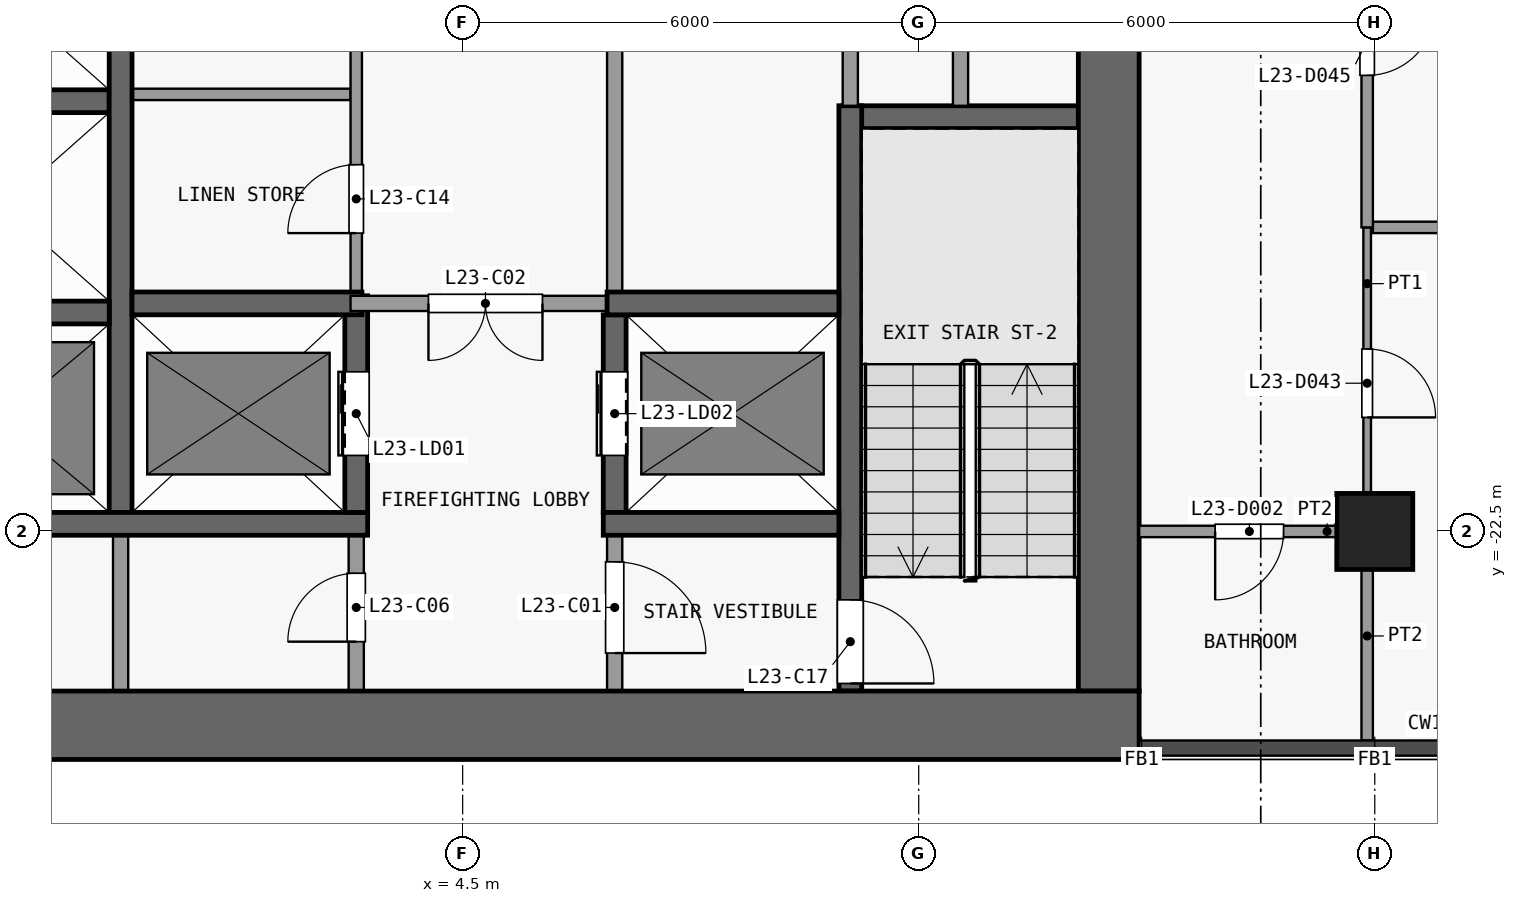
"""IFC4 building model, lengths in metres.
Left out: names, types, materials, properties, quantities, classifications, styles, units other than length and angle.
Written with IfcOpenShell. Run it as: python <this file> out.ifc"""

import sys

from ifc_helpers import new_model, si_unit, direction, frame, frame_2d, origin, origin_2d, place, context, subcontext, project, spatial, rectangle, extrude, element, fill, save


model = new_model("IFC4")
c1 = context("Model", 3, precision=1e-05, world=origin(), true_north=direction((0.0, 1.0)))
c2 = subcontext(c1, "Body", "Model", "MODEL_VIEW")
j1 = project(units=[si_unit("LENGTHUNIT", "METRE"), si_unit("PLANEANGLEUNIT", "RADIAN")], contexts=[c1])
p1 = place(None, origin())
s1 = spatial("IfcSite", under=j1, at=p1, CompositionType="ELEMENT")
p2 = place(p1, origin())
s2 = spatial("IfcBuilding", under=s1, at=p2, CompositionType="ELEMENT")
p3 = place(p2, frame((0.0, 0.0, 95.5)))
s3 = spatial("IfcBuildingStorey", under=s2, at=p3, CompositionType="ELEMENT", Elevation=95.5)
p4 = place(p3, frame((16.5, -22.5, 0.0), z_axis=(0.0, 0.0, 1.0), x_axis=(1.0, 0.0, 0.0)))
e1 = element("IfcColumn", 1, at=p4, inside=s3, PredefinedType="COLUMN", context=c2, shape_type="SweptSolid", body=[
    extrude(rectangle(XDim=1.0, YDim=1.0, at=origin_2d()), origin(), (0.0, 0.0, 1.0), 3.6),
])
p5 = place(p3, frame((-13.4, -25.05, 0.0), z_axis=(0.0, 0.0, 1.0), x_axis=(1.0, 0.0, 0.0)))
e2 = element("IfcWall", 2, at=p5, inside=s3, PredefinedType="SHEAR", context=c2, shape_type="SweptSolid", body=[
    extrude(rectangle(XDim=26.8, YDim=0.9, at=frame_2d((13.4, 0.0))), origin(), (0.0, 0.0, 1.0), 3.3),
])
p6 = place(p3, frame((13.0, -24.6, 0.0), z_axis=(0.0, 0.0, 1.0), x_axis=(0.0, 1.0, 0.0)))
e3 = element("IfcWall", 3, at=p6, inside=s3, PredefinedType="SHEAR", context=c2, shape_type="SweptSolid", body=[
    extrude(rectangle(XDim=16.1, YDim=0.8, at=frame_2d((8.05, 0.0))), origin(), (0.0, 0.0, 1.0), 3.3),
])
p7 = place(p3, frame((-2.95, -22.4, 0.0), z_axis=(0.0, 0.0, 1.0), x_axis=(1.0, 0.0, 0.0)))
e4 = element("IfcWall", 4, at=p7, inside=s3, PredefinedType="SHEAR", context=c2, shape_type="SweptSolid", body=[
    extrude(rectangle(XDim=6.2, YDim=0.3, at=frame_2d((3.1, 0.0))), origin(), (0.0, 0.0, 1.0), 3.3),
])
p8 = place(p3, frame((6.35, -22.4, 0.0), z_axis=(0.0, 0.0, 1.0), x_axis=(1.0, 0.0, 0.0)))
e5 = element("IfcWall", 5, at=p8, inside=s3, PredefinedType="SHEAR", context=c2, shape_type="SweptSolid", body=[
    extrude(rectangle(XDim=3.1, YDim=0.3, at=frame_2d((1.55, 0.0))), origin(), (0.0, 0.0, 1.0), 3.3),
])
p9 = place(p3, frame((-2.95, -19.62, 0.0), z_axis=(0.0, 0.0, 1.0), x_axis=(1.0, 0.0, 0.0)))
e6 = element("IfcWall", 6, at=p9, inside=s3, PredefinedType="SHEAR", context=c2, shape_type="SweptSolid", body=[
    extrude(rectangle(XDim=2.8, YDim=0.3, at=frame_2d((1.4, 0.0))), origin(), (0.0, 0.0, 1.0), 3.3),
])
p10 = place(p3, frame((0.15, -19.5, 0.0), z_axis=(0.0, 0.0, 1.0), x_axis=(1.0, 0.0, 0.0)))
e7 = element("IfcWall", 7, at=p10, inside=s3, PredefinedType="SHEAR", context=c2, shape_type="SweptSolid", body=[
    extrude(rectangle(XDim=3.025, YDim=0.3, at=frame_2d((1.513, 0.0))), origin(), (0.0, 0.0, 1.0), 3.3),
])
p11 = place(p3, frame((6.4, -19.5, 0.0), z_axis=(0.0, 0.0, 1.0), x_axis=(-1.0, 0.0, 0.0)))
e8 = element("IfcWall", 8, at=p11, inside=s3, PredefinedType="PARTITIONING", context=c2, shape_type="SweptSolid", body=[
    extrude(rectangle(XDim=3.375, YDim=0.2, at=frame_2d((1.688, 0.0))), origin(), (0.0, 0.0, 1.0), 3.3),
])
p12 = place(p11, frame((0.85, 0.0, 0.0)))
e9 = element("IfcOpeningElement", 9, at=p12, cuts=e8, PredefinedType="OPENING", context=c2, shape_type="SweptSolid", body=[
    extrude(rectangle(XDim=1.5, YDim=2.1, at=frame_2d((0.75, 1.05))), frame((0.0, 0.11, 0.0), z_axis=(0.0, -1.0, 0.0), x_axis=(1.0, 0.0, 0.0)), (0.0, 0.0, 1.0), 0.22),
])
p13 = place(p3, frame((6.4, -19.5, 0.0), z_axis=(0.0, 0.0, 1.0), x_axis=(1.0, 0.0, 0.0)))
e10 = element("IfcWall", 10, at=p13, inside=s3, PredefinedType="SHEAR", context=c2, shape_type="SweptSolid", body=[
    extrude(rectangle(XDim=3.05, YDim=0.3, at=frame_2d((1.525, 0.0))), origin(), (0.0, 0.0, 1.0), 3.3),
])
p14 = place(p3, frame((9.5, -17.05, 0.0), z_axis=(0.0, 0.0, 1.0), x_axis=(1.0, 0.0, 0.0)))
e11 = element("IfcWall", 11, at=p14, inside=s3, PredefinedType="SHEAR", context=c2, shape_type="SweptSolid", body=[
    extrude(rectangle(XDim=3.1, YDim=0.3, at=frame_2d((1.55, 0.0))), origin(), (0.0, 0.0, 1.0), 3.3),
])
p15 = place(p3, frame((-2.95, -16.84, 0.0), z_axis=(0.0, 0.0, 1.0), x_axis=(1.0, 0.0, 0.0)))
e12 = element("IfcWall", 12, at=p15, inside=s3, PredefinedType="SHEAR", context=c2, shape_type="SweptSolid", body=[
    extrude(rectangle(XDim=2.8, YDim=0.3, at=frame_2d((1.4, 0.0))), origin(), (0.0, 0.0, 1.0), 3.3),
])
p16 = place(p3, frame((0.15, -16.75, 0.0), z_axis=(0.0, 0.0, 1.0), x_axis=(1.0, 0.0, 0.0)))
e13 = element("IfcWall", 13, at=p16, inside=s3, PredefinedType="PARTITIONING", context=c2, shape_type="SweptSolid", body=[
    extrude(rectangle(XDim=2.875, YDim=0.15, at=frame_2d((1.438, 0.0))), origin(), (0.0, 0.0, 1.0), 3.3),
])
p17 = place(p3, frame((0.0, -24.6, 0.0), z_axis=(0.0, 0.0, 1.0), x_axis=(0.0, 1.0, 0.0)))
e14 = element("IfcWall", 14, at=p17, inside=s3, PredefinedType="PARTITIONING", context=c2, shape_type="SweptSolid", body=[
    extrude(rectangle(XDim=2.05, YDim=0.2, at=frame_2d((1.025, 0.0))), origin(), (0.0, 0.0, 1.0), 3.3),
])
p18 = place(p3, frame((0.0, -22.25, 0.0), z_axis=(0.0, 0.0, 1.0), x_axis=(0.0, 1.0, 0.0)))
e15 = element("IfcWall", 15, at=p18, inside=s3, PredefinedType="SHEAR", context=c2, shape_type="SweptSolid", body=[
    extrude(rectangle(XDim=13.75, YDim=0.3, at=frame_2d((6.875, 0.0))), origin(), (0.0, 0.0, 1.0), 3.3),
])
p19 = place(p3, frame((3.1, -24.6, 0.0), z_axis=(0.0, 0.0, 1.0), x_axis=(0.0, 1.0, 0.0)))
e16 = element("IfcWall", 16, at=p19, inside=s3, PredefinedType="PARTITIONING", context=c2, shape_type="SweptSolid", body=[
    extrude(rectangle(XDim=2.05, YDim=0.2, at=frame_2d((1.025, 0.0))), origin(), (0.0, 0.0, 1.0), 3.3),
])
p20 = place(p19, frame((0.65, 0.0, 0.0)))
e17 = element("IfcOpeningElement", 17, at=p20, cuts=e16, PredefinedType="OPENING", context=c2, shape_type="SweptSolid", body=[
    extrude(rectangle(XDim=0.9, YDim=2.1, at=frame_2d((0.45, 1.05))), frame((0.0, 0.11, 0.0), z_axis=(0.0, -1.0, 0.0), x_axis=(1.0, 0.0, 0.0)), (0.0, 0.0, 1.0), 0.22),
])
p21 = place(p3, frame((3.1, -22.25, 0.0), z_axis=(0.0, 0.0, 1.0), x_axis=(0.0, 1.0, 0.0)))
e18 = element("IfcWall", 18, at=p21, inside=s3, PredefinedType="SHEAR", context=c2, shape_type="SweptSolid", body=[
    extrude(rectangle(XDim=2.85, YDim=0.3, at=frame_2d((1.425, 0.0))), origin(), (0.0, 0.0, 1.0), 3.3),
])
p22 = place(p21, frame((0.75, 0.0, 0.0)))
e19 = element("IfcOpeningElement", 19, at=p22, cuts=e18, PredefinedType="OPENING", context=c2, shape_type="SweptSolid", body=[
    extrude(rectangle(XDim=1.1, YDim=2.1, at=frame_2d((0.55, 1.05))), frame((0.0, 0.16, 0.0), z_axis=(0.0, -1.0, 0.0), x_axis=(1.0, 0.0, 0.0)), (0.0, 0.0, 1.0), 0.32),
])
p23 = place(p3, frame((3.1, -19.4, 0.0), z_axis=(0.0, 0.0, 1.0), x_axis=(0.0, 1.0, 0.0)))
e20 = element("IfcWall", 20, at=p23, inside=s3, PredefinedType="PARTITIONING", context=c2, shape_type="SweptSolid", body=[
    extrude(rectangle(XDim=10.9, YDim=0.15, at=frame_2d((5.45, 0.0))), origin(), (0.0, 0.0, 1.0), 3.3),
])
p24 = place(p23, frame((0.825, 0.0, 0.0)))
e21 = element("IfcOpeningElement", 21, at=p24, cuts=e20, PredefinedType="OPENING", context=c2, shape_type="SweptSolid", body=[
    extrude(rectangle(XDim=0.9, YDim=2.1, at=frame_2d((0.45, 1.05))), frame((0.0, 0.085, 0.0), z_axis=(0.0, -1.0, 0.0), x_axis=(1.0, 0.0, 0.0)), (0.0, 0.0, 1.0), 0.17),
])
p25 = place(p23, frame((6.175, 0.0, 0.0)))
e22 = element("IfcOpeningElement", 22, at=p25, cuts=e20, PredefinedType="OPENING", context=c2, shape_type="SweptSolid", body=[
    extrude(rectangle(XDim=1.2, YDim=2.1, at=frame_2d((0.6, 1.05))), frame((0.0, 0.085, 0.0), z_axis=(0.0, -1.0, 0.0), x_axis=(1.0, 0.0, 0.0)), (0.0, 0.0, 1.0), 0.17),
])
p26 = place(p3, frame((6.5, -22.55, 0.0), z_axis=(0.0, 0.0, 1.0), x_axis=(0.0, -1.0, 0.0)))
e23 = element("IfcWall", 23, at=p26, inside=s3, PredefinedType="PARTITIONING", context=c2, shape_type="SweptSolid", body=[
    extrude(rectangle(XDim=2.05, YDim=0.2, at=frame_2d((1.025, 0.0))), origin(), (0.0, 0.0, 1.0), 3.3),
])
p27 = place(p26, frame((0.35, 0.0, 0.0)))
e24 = element("IfcOpeningElement", 24, at=p27, cuts=e23, PredefinedType="OPENING", context=c2, shape_type="SweptSolid", body=[
    extrude(rectangle(XDim=1.2, YDim=2.1, at=frame_2d((0.6, 1.05))), frame((0.0, 0.11, 0.0), z_axis=(0.0, -1.0, 0.0), x_axis=(1.0, 0.0, 0.0)), (0.0, 0.0, 1.0), 0.22),
])
p28 = place(p3, frame((6.5, -22.25, 0.0), z_axis=(0.0, 0.0, 1.0), x_axis=(0.0, 1.0, 0.0)))
e25 = element("IfcWall", 25, at=p28, inside=s3, PredefinedType="SHEAR", context=c2, shape_type="SweptSolid", body=[
    extrude(rectangle(XDim=2.6, YDim=0.3, at=frame_2d((1.3, 0.0))), origin(), (0.0, 0.0, 1.0), 3.3),
])
p29 = place(p28, frame((0.75, 0.0, 0.0)))
e26 = element("IfcOpeningElement", 26, at=p29, cuts=e25, PredefinedType="OPENING", context=c2, shape_type="SweptSolid", body=[
    extrude(rectangle(XDim=1.1, YDim=2.1, at=frame_2d((0.55, 1.05))), frame((0.0, 0.16, 0.0), z_axis=(0.0, -1.0, 0.0), x_axis=(1.0, 0.0, 0.0)), (0.0, 0.0, 1.0), 0.32),
])
p30 = place(p3, frame((6.5, -8.5, 0.0), z_axis=(0.0, 0.0, 1.0), x_axis=(0.0, -1.0, 0.0)))
e27 = element("IfcWall", 27, at=p30, inside=s3, PredefinedType="PARTITIONING", context=c2, shape_type="SweptSolid", body=[
    extrude(rectangle(XDim=10.85, YDim=0.2, at=frame_2d((5.425, 0.0))), origin(), (0.0, 0.0, 1.0), 3.3),
])
p31 = place(p30, frame((4.9, 0.0, 0.0)))
e28 = element("IfcOpeningElement", 28, at=p31, cuts=e27, PredefinedType="OPENING", context=c2, shape_type="SweptSolid", body=[
    extrude(rectangle(XDim=1.2, YDim=2.1, at=frame_2d((0.6, 1.05))), frame((0.0, 0.11, 0.0), z_axis=(0.0, -1.0, 0.0), x_axis=(1.0, 0.0, 0.0)), (0.0, 0.0, 1.0), 0.22),
])
p32 = place(p3, frame((9.6, -16.9, 0.0), z_axis=(0.0, 0.0, 1.0), x_axis=(0.0, -1.0, 0.0)))
e29 = element("IfcWall", 29, at=p32, inside=s3, PredefinedType="SHEAR", context=c2, shape_type="SweptSolid", body=[
    extrude(rectangle(XDim=7.7, YDim=0.3, at=frame_2d((3.85, 0.0))), origin(), (0.0, 0.0, 1.0), 3.3),
])
p33 = place(p32, frame((6.5, 0.0, 0.0)))
e30 = element("IfcOpeningElement", 30, at=p33, cuts=e29, PredefinedType="OPENING", context=c2, shape_type="SweptSolid", body=[
    extrude(rectangle(XDim=1.1, YDim=2.1, at=frame_2d((0.55, 1.05))), frame((0.0, 0.16, 0.0), z_axis=(0.0, -1.0, 0.0), x_axis=(1.0, 0.0, 0.0)), (0.0, 0.0, 1.0), 0.32),
])
p34 = place(p3, frame((9.6, -16.9, 0.0), z_axis=(0.0, 0.0, 1.0), x_axis=(0.0, 1.0, 0.0)))
e31 = element("IfcWall", 31, at=p34, inside=s3, PredefinedType="PARTITIONING", context=c2, shape_type="SweptSolid", body=[
    extrude(rectangle(XDim=8.4, YDim=0.2, at=frame_2d((4.2, 0.0))), origin(), (0.0, 0.0, 1.0), 3.3),
])
p35 = place(p3, frame((11.05, -10.5, 0.0), z_axis=(0.0, 0.0, 1.0), x_axis=(0.0, -1.0, 0.0)))
e32 = element("IfcWall", 32, at=p35, inside=s3, PredefinedType="PARTITIONING", context=c2, shape_type="SweptSolid", body=[
    extrude(rectangle(XDim=6.4, YDim=0.2, at=frame_2d((3.2, 0.0))), origin(), (0.0, 0.0, 1.0), 3.3),
])
p36 = place(p35, frame((2.875, 0.0, 0.0)))
e33 = element("IfcOpeningElement", 33, at=p36, cuts=e32, PredefinedType="OPENING", context=c2, shape_type="SweptSolid", body=[
    extrude(rectangle(XDim=0.9, YDim=2.1, at=frame_2d((0.45, 1.05))), frame((0.0, 0.11, 0.0), z_axis=(0.0, -1.0, 0.0), x_axis=(1.0, 0.0, 0.0)), (0.0, 0.0, 1.0), 0.22),
])
p37 = place(p3, frame((13.4, -22.5, 0.0), z_axis=(0.0, 0.0, 1.0), x_axis=(1.0, 0.0, 0.0)))
e34 = element("IfcWall", 34, at=p37, inside=s3, PredefinedType="PARTITIONING", context=c2, shape_type="SweptSolid", body=[
    extrude(rectangle(XDim=2.925, YDim=0.15, at=frame_2d((1.462, 0.0))), origin(), (0.0, 0.0, 1.0), 3.3),
])
p38 = place(p37, frame((1.0, 0.0, 0.0)))
e35 = element("IfcOpeningElement", 35, at=p38, cuts=e34, PredefinedType="OPENING", context=c2, shape_type="SweptSolid", body=[
    extrude(rectangle(XDim=0.9, YDim=2.1, at=frame_2d((0.45, 1.05))), frame((0.0, 0.085, 0.0), z_axis=(0.0, -1.0, 0.0), x_axis=(1.0, 0.0, 0.0)), (0.0, 0.0, 1.0), 0.17),
])
p39 = place(p3, frame((16.475, -18.5, 0.0), z_axis=(0.0, 0.0, 1.0), x_axis=(1.0, 0.0, 0.0)))
e36 = element("IfcWall", 36, at=p39, inside=s3, PredefinedType="PARTITIONING", context=c2, shape_type="SweptSolid", body=[
    extrude(rectangle(XDim=2.525, YDim=0.15, at=frame_2d((1.262, 0.0))), origin(), (0.0, 0.0, 1.0), 3.3),
])
p40 = place(p3, frame((16.4, -22.5, 0.0), z_axis=(0.0, 0.0, 1.0), x_axis=(0.0, 1.0, 0.0)))
e37 = element("IfcWall", 37, at=p40, inside=s3, PredefinedType="PARTITIONING", context=c2, shape_type="SweptSolid", body=[
    extrude(rectangle(XDim=4.0, YDim=0.1, at=frame_2d((2.0, 0.0))), origin(), (0.0, 0.0, 1.0), 3.3),
])
p41 = place(p40, frame((1.5, 0.0, 0.0)))
e38 = element("IfcOpeningElement", 38, at=p41, cuts=e37, PredefinedType="OPENING", context=c2, shape_type="SweptSolid", body=[
    extrude(rectangle(XDim=0.9, YDim=2.1, at=frame_2d((0.45, 1.05))), frame((0.0, 0.06, 0.0), z_axis=(0.0, -1.0, 0.0), x_axis=(1.0, 0.0, 0.0)), (0.0, 0.0, 1.0), 0.12),
])
p42 = place(p3, frame((16.4, -25.25, 0.0), z_axis=(0.0, 0.0, 1.0), x_axis=(0.0, 1.0, 0.0)))
e39 = element("IfcWall", 39, at=p42, inside=s3, PredefinedType="PARTITIONING", context=c2, shape_type="SweptSolid", body=[
    extrude(rectangle(XDim=2.75, YDim=0.15, at=frame_2d((1.375, 0.0))), origin(), (0.0, 0.0, 1.0), 3.3),
])
p43 = place(p3, frame((16.4, -18.5, 0.0), z_axis=(0.0, 0.0, 1.0), x_axis=(0.0, 1.0, 0.0)))
e40 = element("IfcWall", 40, at=p43, inside=s3, PredefinedType="PARTITIONING", context=c2, shape_type="SweptSolid", body=[
    extrude(rectangle(XDim=5.0, YDim=0.15, at=frame_2d((2.5, 0.0))), origin(), (0.0, 0.0, 1.0), 3.3),
])
p44 = place(p43, frame((2.0, 0.0, 0.0)))
e41 = element("IfcOpeningElement", 41, at=p44, cuts=e40, PredefinedType="OPENING", context=c2, shape_type="SweptSolid", body=[
    extrude(rectangle(XDim=0.9, YDim=2.1, at=frame_2d((0.45, 1.05))), frame((0.0, 0.085, 0.0), z_axis=(0.0, -1.0, 0.0), x_axis=(1.0, 0.0, 0.0)), (0.0, 0.0, 1.0), 0.17),
])
p45 = place(p22, origin())
e42 = element("IfcDoor", 42, at=p45, inside=s3, OperationType="DOUBLE_DOOR_SLIDING", PredefinedType="DOOR", context=c2, shape_type="SweptSolid", body=[
    extrude(rectangle(XDim=1.1, YDim=2.1, at=frame_2d((0.55, 1.05))), frame((0.0, 0.025, 0.0), z_axis=(0.0, -1.0, 0.0), x_axis=(1.0, 0.0, 0.0)), (0.0, 0.0, 1.0), 0.05),
])
fill(e19, e42)
p46 = place(p29, origin())
e43 = element("IfcDoor", 43, at=p46, inside=s3, OperationType="DOUBLE_DOOR_SLIDING", PredefinedType="DOOR", context=c2, shape_type="SweptSolid", body=[
    extrude(rectangle(XDim=1.1, YDim=2.1, at=frame_2d((0.55, 1.05))), frame((0.0, 0.025, 0.0), z_axis=(0.0, -1.0, 0.0), x_axis=(1.0, 0.0, 0.0)), (0.0, 0.0, 1.0), 0.05),
])
fill(e26, e43)
p47 = place(p27, origin())
e44 = element("IfcDoor", 44, at=p47, inside=s3, OperationType="SINGLE_SWING_RIGHT", PredefinedType="DOOR", context=c2, shape_type="SweptSolid", body=[
    extrude(rectangle(XDim=1.2, YDim=2.1, at=frame_2d((0.6, 1.05))), frame((0.0, 0.025, 0.0), z_axis=(0.0, -1.0, 0.0), x_axis=(1.0, 0.0, 0.0)), (0.0, 0.0, 1.0), 0.05),
])
fill(e24, e44)
p48 = place(p12, origin())
e45 = element("IfcDoor", 45, at=p48, inside=s3, OperationType="DOUBLE_DOOR_SINGLE_SWING", PredefinedType="DOOR", context=c2, shape_type="SweptSolid", body=[
    extrude(rectangle(XDim=1.5, YDim=2.1, at=frame_2d((0.75, 1.05))), frame((0.0, 0.025, 0.0), z_axis=(0.0, -1.0, 0.0), x_axis=(1.0, 0.0, 0.0)), (0.0, 0.0, 1.0), 0.05),
])
fill(e9, e45)
p49 = place(p20, origin())
e46 = element("IfcDoor", 46, at=p49, inside=s3, OperationType="SINGLE_SWING_LEFT", PredefinedType="DOOR", context=c2, shape_type="SweptSolid", body=[
    extrude(rectangle(XDim=0.9, YDim=2.1, at=frame_2d((0.45, 1.05))), frame((0.0, 0.025, 0.0), z_axis=(0.0, -1.0, 0.0), x_axis=(1.0, 0.0, 0.0)), (0.0, 0.0, 1.0), 0.05),
])
fill(e17, e46)
p50 = place(p24, origin())
e47 = element("IfcDoor", 47, at=p50, inside=s3, OperationType="SINGLE_SWING_LEFT", PredefinedType="DOOR", context=c2, shape_type="SweptSolid", body=[
    extrude(rectangle(XDim=0.9, YDim=2.1, at=frame_2d((0.45, 1.05))), frame((0.0, 0.025, 0.0), z_axis=(0.0, -1.0, 0.0), x_axis=(1.0, 0.0, 0.0)), (0.0, 0.0, 1.0), 0.05),
])
fill(e21, e47)
p51 = place(p33, origin())
e48 = element("IfcDoor", 48, at=p51, inside=s3, OperationType="SINGLE_SWING_RIGHT", PredefinedType="DOOR", context=c2, shape_type="SweptSolid", body=[
    extrude(rectangle(XDim=1.1, YDim=2.1, at=frame_2d((0.55, 1.05))), frame((0.0, 0.025, 0.0), z_axis=(0.0, -1.0, 0.0), x_axis=(1.0, 0.0, 0.0)), (0.0, 0.0, 1.0), 0.05),
])
fill(e30, e48)
p52 = place(p38, origin())
e49 = element("IfcDoor", 49, at=p52, inside=s3, OperationType="SINGLE_SWING_LEFT", PredefinedType="DOOR", context=c2, shape_type="SweptSolid", body=[
    extrude(rectangle(XDim=0.9, YDim=2.1, at=frame_2d((0.45, 1.05))), frame((0.0, 0.025, 0.0), z_axis=(0.0, -1.0, 0.0), x_axis=(1.0, 0.0, 0.0)), (0.0, 0.0, 1.0), 0.05),
])
fill(e35, e49)
p53 = place(p41, origin())
e50 = element("IfcDoor", 50, at=p53, inside=s3, OperationType="SINGLE_SWING_LEFT", PredefinedType="DOOR", context=c2, shape_type="SweptSolid", body=[
    extrude(rectangle(XDim=0.9, YDim=2.1, at=frame_2d((0.45, 1.05))), frame((0.0, 0.025, 0.0), z_axis=(0.0, -1.0, 0.0), x_axis=(1.0, 0.0, 0.0)), (0.0, 0.0, 1.0), 0.05),
])
fill(e38, e50)
p54 = place(p44, origin())
e51 = element("IfcDoor", 51, at=p54, inside=s3, OperationType="SINGLE_SWING_RIGHT", PredefinedType="DOOR", context=c2, shape_type="SweptSolid", body=[
    extrude(rectangle(XDim=0.9, YDim=2.1, at=frame_2d((0.45, 1.05))), frame((0.0, 0.025, 0.0), z_axis=(0.0, -1.0, 0.0), x_axis=(1.0, 0.0, 0.0)), (0.0, 0.0, 1.0), 0.05),
])
fill(e41, e51)
save(model, sys.argv[1])
